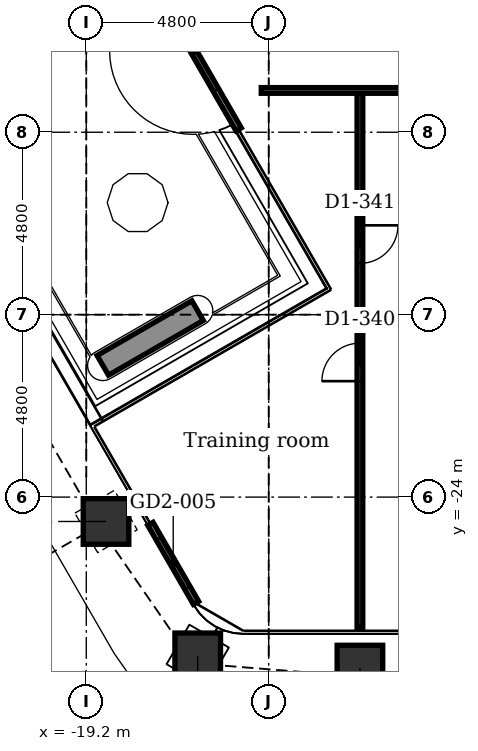
"""IFC4 building model, lengths in metres.
Left out: names, types, materials, properties, quantities, classifications, styles, units other than length and angle.
Written with IfcOpenShell. Run it as: python <this file> out.ifc"""

import sys

from ifc_helpers import new_model, si_unit, direction, frame, frame_2d, origin, origin_2d, place, context, subcontext, project, spatial, rectangle, extrude, element, fill, save


model = new_model("IFC4")
c1 = context("Model", 3, precision=1e-05, world=origin(), true_north=direction((0.0, 1.0)))
c2 = subcontext(c1, "Body", "Model", "MODEL_VIEW")
j1 = project(units=[si_unit("LENGTHUNIT", "METRE"), si_unit("PLANEANGLEUNIT", "RADIAN")], contexts=[c1])
p1 = place(None, origin())
s1 = spatial("IfcSite", under=j1, at=p1, CompositionType="ELEMENT")
p2 = place(p1, origin())
s2 = spatial("IfcBuilding", under=s1, at=p2, CompositionType="ELEMENT")
p3 = place(p2, frame((0.0, 0.0, 122.9)))
s3 = spatial("IfcBuildingStorey", under=s2, at=p3, CompositionType="ELEMENT", Elevation=122.9)
for number, where, z_axis, x_axis in (
    (1, (-12.0, -28.499, -0.2), (0.0, 0.0, 1.0), (1.0, 0.0, 0.0)),
    (2, (-16.268, -28.177, -0.2), (0.0, 0.0, 1.0), (0.5, 0.866, 0.0)),
    (3, (-18.68, -24.642, -0.2), (0.0, 0.0, 1.0), (0.866, 0.5, 0.0)),
):
    element("IfcColumn", number, at=place(p3, frame(where, z_axis=z_axis, x_axis=x_axis)), inside=s3, PredefinedType="COLUMN", context=c2, shape_type="SweptSolid", body=[
        extrude(rectangle(XDim=1.2, YDim=1.2, at=origin_2d()), origin(), (0.0, 0.0, 1.0), 4.4),
    ])
p4 = place(p3, frame((-16.313, -26.782, 0.0), z_axis=(0.0, 0.0, 1.0), x_axis=(-0.500001309137, 0.866024647952, 0.0)))
e4 = element("IfcWall", 4, at=p4, inside=s3, PredefinedType="PARTITIONING", context=c2, shape_type="SweptSolid", body=[
    extrude(rectangle(XDim=2.4, YDim=0.16, at=frame_2d((1.2, 0.0))), origin(), (0.0, 0.0, 1.0), 4.2),
])
p5 = place(p4, frame((0.45, 0.0, 0.0)))
e5 = element("IfcOpeningElement", 5, at=p5, cuts=e4, PredefinedType="OPENING", context=c2, shape_type="SweptSolid", body=[
    extrude(rectangle(XDim=1.5, YDim=2.4, at=frame_2d((0.75, 1.2))), frame((0.0, 0.09, 0.0), z_axis=(0.0, -1.0, 0.0), x_axis=(1.0, 0.0, 0.0)), (0.0, 0.0, 1.0), 0.18),
])
p6 = place(p3, frame((-15.191, -14.325, 0.0), z_axis=(0.0, 0.0, 1.0), x_axis=(-0.500001003139, 0.866024824621, 0.0)))
e6 = element("IfcWall", 6, at=p6, inside=s3, PredefinedType="PARTITIONING", context=c2, shape_type="SweptSolid", body=[
    extrude(rectangle(XDim=4.78, YDim=0.16, at=frame_2d((2.39, 0.0))), origin(), (0.0, 0.0, 1.0), 4.2),
])
p7 = place(p6, frame((1.19, 0.0, 0.0)))
e7 = element("IfcOpeningElement", 7, at=p7, cuts=e6, PredefinedType="OPENING", context=c2, shape_type="SweptSolid", body=[
    extrude(rectangle(XDim=2.4, YDim=2.4, at=frame_2d((1.2, 1.2))), frame((0.0, 0.09, 0.0), z_axis=(0.0, -1.0, 0.0), x_axis=(1.0, 0.0, 0.0)), (0.0, 0.0, 1.0), 0.18),
])
p8 = place(p3, frame((-16.271, -19.094, 0.0), z_axis=(0.0, 0.0, 1.0), x_axis=(-0.865996417519, -0.500050202324, 0.0)))
e8 = element("IfcWall", 8, at=p8, inside=s3, PredefinedType="USERDEFINED", context=c2, shape_type="SweptSolid", body=[
    extrude(rectangle(XDim=2.88, YDim=0.6, at=frame_2d((1.44, 0.0))), origin(), (0.0, 0.0, 1.0), 0.7),
])
p9 = place(p3, frame((-12.0, -27.428, 0.0), z_axis=(0.0, 0.0, 1.0), x_axis=(0.0, 1.0, 0.0)))
e9 = element("IfcWall", 9, at=p9, inside=s3, PredefinedType="PARTITIONING", context=c2, shape_type="SweptSolid", body=[
    extrude(rectangle(XDim=14.128, YDim=0.15, at=frame_2d((7.064, 0.0))), origin(), (0.0, 0.0, 1.0), 4.2),
])
p10 = place(p9, frame((6.479, 0.0, 0.0)))
e10 = element("IfcOpeningElement", 10, at=p10, cuts=e9, PredefinedType="OPENING", context=c2, shape_type="SweptSolid", body=[
    extrude(rectangle(XDim=1.0, YDim=2.1, at=frame_2d((0.5, 1.05))), frame((0.0, 0.085, 0.0), z_axis=(0.0, -1.0, 0.0), x_axis=(1.0, 0.0, 0.0)), (0.0, 0.0, 1.0), 0.17),
])
p11 = place(p9, frame((9.579, 0.0, 0.0)))
e11 = element("IfcOpeningElement", 11, at=p11, cuts=e9, PredefinedType="OPENING", context=c2, shape_type="SweptSolid", body=[
    extrude(rectangle(XDim=1.0, YDim=2.1, at=frame_2d((0.5, 1.05))), frame((0.0, 0.085, 0.0), z_axis=(0.0, -1.0, 0.0), x_axis=(1.0, 0.0, 0.0)), (0.0, 0.0, 1.0), 0.17),
])
p12 = place(p3, frame((-14.596, -13.3, 0.0), z_axis=(0.0, 0.0, 1.0), x_axis=(1.0, 0.0, 0.0)))
e12 = element("IfcWall", 12, at=p12, inside=s3, PredefinedType="PARTITIONING", context=c2, shape_type="SweptSolid", body=[
    extrude(rectangle(XDim=33.796, YDim=0.15, at=frame_2d((16.898, 0.0))), origin(), (0.0, 0.0, 1.0), 4.2),
])
p13 = place(p12, frame((6.896, 0.0, 0.0)))
e13 = element("IfcOpeningElement", 13, at=p13, cuts=e12, PredefinedType="OPENING", context=c2, shape_type="SweptSolid", body=[
    extrude(rectangle(XDim=1.0, YDim=2.1, at=frame_2d((0.5, 1.05))), frame((0.0, 0.085, 0.0), z_axis=(0.0, -1.0, 0.0), x_axis=(1.0, 0.0, 0.0)), (0.0, 0.0, 1.0), 0.17),
])
p14 = place(p12, frame((10.671, 0.0, 0.0)))
e14 = element("IfcOpeningElement", 14, at=p14, cuts=e12, PredefinedType="OPENING", context=c2, shape_type="SweptSolid", body=[
    extrude(rectangle(XDim=1.0, YDim=2.1, at=frame_2d((0.5, 1.05))), frame((0.0, 0.085, 0.0), z_axis=(0.0, -1.0, 0.0), x_axis=(1.0, 0.0, 0.0)), (0.0, 0.0, 1.0), 0.17),
])
p15 = place(p12, frame((12.821, 0.0, 0.0)))
e15 = element("IfcOpeningElement", 15, at=p15, cuts=e12, PredefinedType="OPENING", context=c2, shape_type="SweptSolid", body=[
    extrude(rectangle(XDim=1.0, YDim=2.1, at=frame_2d((0.5, 1.05))), frame((0.0, 0.085, 0.0), z_axis=(0.0, -1.0, 0.0), x_axis=(1.0, 0.0, 0.0)), (0.0, 0.0, 1.0), 0.17),
])
p16 = place(p12, frame((22.031, 0.0, 0.0)))
e16 = element("IfcOpeningElement", 16, at=p16, cuts=e12, PredefinedType="OPENING", context=c2, shape_type="SweptSolid", body=[
    extrude(rectangle(XDim=1.0, YDim=2.1, at=frame_2d((0.5, 1.05))), frame((0.0, 0.085, 0.0), z_axis=(0.0, -1.0, 0.0), x_axis=(1.0, 0.0, 0.0)), (0.0, 0.0, 1.0), 0.17),
])
p17 = place(p12, frame((24.821, 0.0, 0.0)))
e17 = element("IfcOpeningElement", 17, at=p17, cuts=e12, PredefinedType="OPENING", context=c2, shape_type="SweptSolid", body=[
    extrude(rectangle(XDim=1.0, YDim=2.1, at=frame_2d((0.5, 1.05))), frame((0.0, 0.085, 0.0), z_axis=(0.0, -1.0, 0.0), x_axis=(1.0, 0.0, 0.0)), (0.0, 0.0, 1.0), 0.17),
])
p18 = place(p12, frame((27.421, 0.0, 0.0)))
e18 = element("IfcOpeningElement", 18, at=p18, cuts=e12, PredefinedType="OPENING", context=c2, shape_type="SweptSolid", body=[
    extrude(rectangle(XDim=1.0, YDim=2.1, at=frame_2d((0.5, 1.05))), frame((0.0, 0.085, 0.0), z_axis=(0.0, -1.0, 0.0), x_axis=(1.0, 0.0, 0.0)), (0.0, 0.0, 1.0), 0.17),
])
p19 = place(p12, frame((29.696, 0.0, 0.0)))
e19 = element("IfcOpeningElement", 19, at=p19, cuts=e12, PredefinedType="OPENING", context=c2, shape_type="SweptSolid", body=[
    extrude(rectangle(XDim=1.0, YDim=2.1, at=frame_2d((0.5, 1.05))), frame((0.0, 0.085, 0.0), z_axis=(0.0, -1.0, 0.0), x_axis=(1.0, 0.0, 0.0)), (0.0, 0.0, 1.0), 0.17),
])
p20 = place(p12, frame((16.546, 0.0, 0.0)))
e20 = element("IfcOpeningElement", 20, at=p20, cuts=e12, PredefinedType="OPENING", context=c2, shape_type="SweptSolid", body=[
    extrude(rectangle(XDim=0.9, YDim=2.1, at=frame_2d((0.45, 1.05))), frame((0.0, 0.085, 0.0), z_axis=(0.0, -1.0, 0.0), x_axis=(1.0, 0.0, 0.0)), (0.0, 0.0, 1.0), 0.17),
])
p21 = place(p12, frame((19.546, 0.0, 0.0)))
e21 = element("IfcOpeningElement", 21, at=p21, cuts=e12, PredefinedType="OPENING", context=c2, shape_type="SweptSolid", body=[
    extrude(rectangle(XDim=0.9, YDim=2.1, at=frame_2d((0.45, 1.05))), frame((0.0, 0.085, 0.0), z_axis=(0.0, -1.0, 0.0), x_axis=(1.0, 0.0, 0.0)), (0.0, 0.0, 1.0), 0.17),
])
p22 = place(p5, origin())
e22 = element("IfcDoor", 22, at=p22, inside=s3, OperationType="DOUBLE_DOOR_SLIDING", PredefinedType="DOOR", context=c2, shape_type="SweptSolid", body=[
    extrude(rectangle(XDim=1.5, YDim=2.4, at=frame_2d((0.75, 1.2))), frame((0.0, 0.025, 0.0), z_axis=(0.0, -1.0, 0.0), x_axis=(1.0, 0.0, 0.0)), (0.0, 0.0, 1.0), 0.05),
])
fill(e5, e22)
p23 = place(p7, origin())
e23 = element("IfcDoor", 23, at=p23, inside=s3, OperationType="DOUBLE_DOOR_SLIDING", PredefinedType="DOOR", context=c2, shape_type="SweptSolid", body=[
    extrude(rectangle(XDim=2.4, YDim=2.4, at=frame_2d((1.2, 1.2))), frame((0.0, 0.025, 0.0), z_axis=(0.0, -1.0, 0.0), x_axis=(1.0, 0.0, 0.0)), (0.0, 0.0, 1.0), 0.05),
])
fill(e7, e23)
p24 = place(p10, origin())
e24 = element("IfcDoor", 24, at=p24, inside=s3, OperationType="SINGLE_SWING_LEFT", PredefinedType="DOOR", context=c2, shape_type="SweptSolid", body=[
    extrude(rectangle(XDim=1.0, YDim=2.1, at=frame_2d((0.5, 1.05))), frame((0.0, 0.025, 0.0), z_axis=(0.0, -1.0, 0.0), x_axis=(1.0, 0.0, 0.0)), (0.0, 0.0, 1.0), 0.05),
])
fill(e10, e24)
p25 = place(p11, frame((1.0, 0.0, 0.0), z_axis=(0.0, 0.0, 1.0), x_axis=(-1.0, 0.0, 0.0)))
e25 = element("IfcDoor", 25, at=p25, inside=s3, OperationType="SINGLE_SWING_RIGHT", PredefinedType="DOOR", context=c2, shape_type="SweptSolid", body=[
    extrude(rectangle(XDim=1.0, YDim=2.1, at=frame_2d((0.5, 1.05))), frame((0.0, 0.025, 0.0), z_axis=(0.0, -1.0, 0.0), x_axis=(1.0, 0.0, 0.0)), (0.0, 0.0, 1.0), 0.05),
])
fill(e11, e25)
save(model, sys.argv[1])
